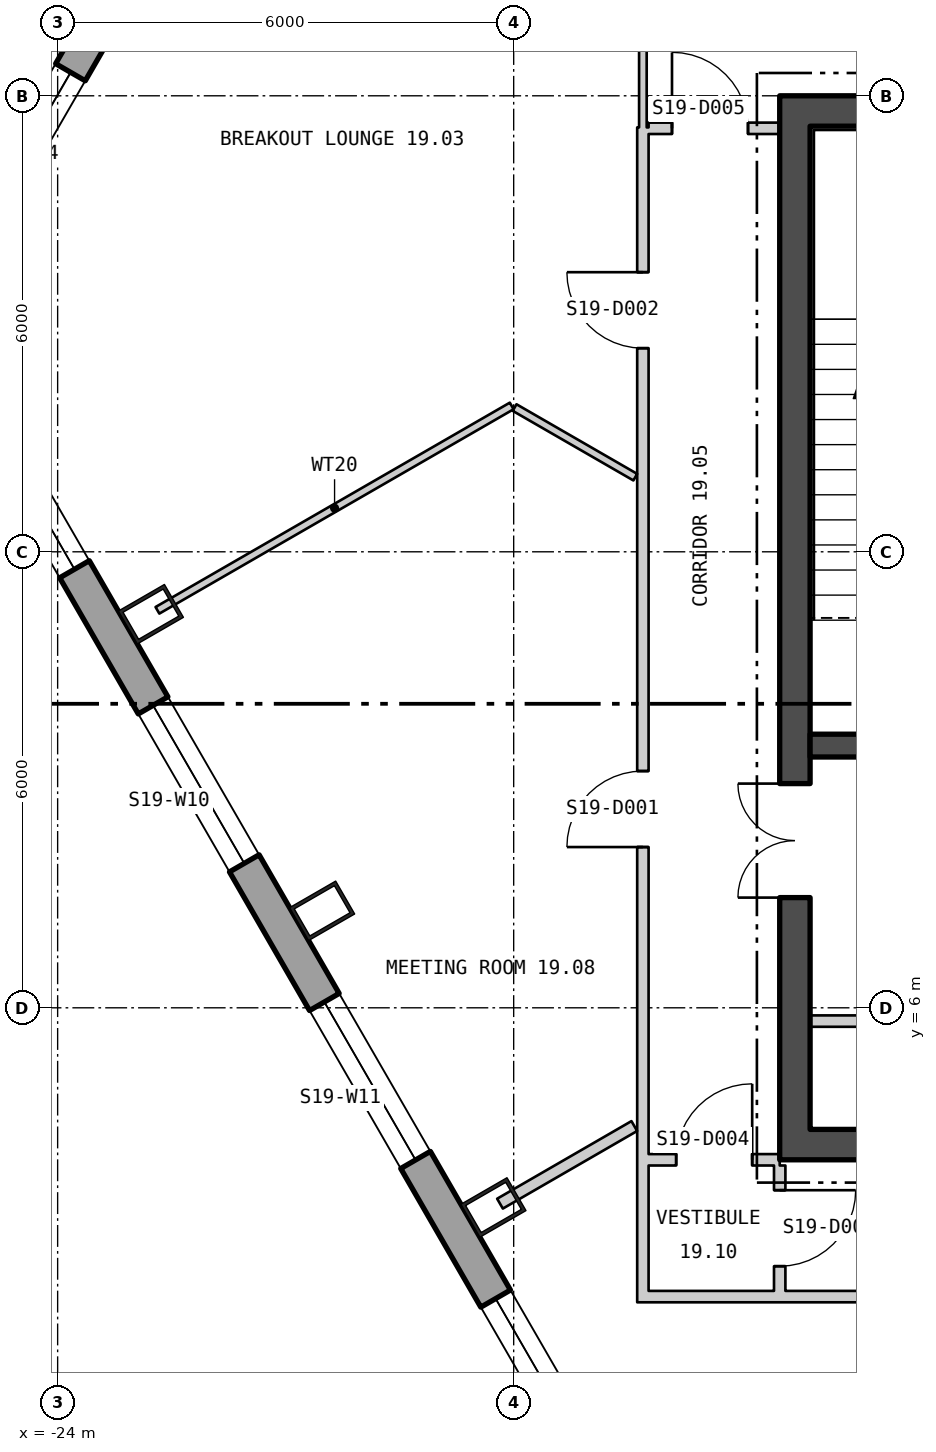
"""IFC4 building model, lengths in metres.
Left out: names, types, materials, properties, quantities, classifications, styles, units other than length and angle.
Written with IfcOpenShell. Run it as: python <this file> out.ifc"""

import sys

from ifc_helpers import new_model, si_unit, direction, frame, frame_2d, origin, origin_2d, place, context, subcontext, project, spatial, polyline, rectangle, hollow_rectangle, outline, extrude, element, fill, save


model = new_model("IFC4")
c1 = context("Model", 3, precision=1e-05, world=origin(), true_north=direction((0.0, 1.0)))
c2 = subcontext(c1, "Body", "Model", "MODEL_VIEW")
j1 = project(units=[si_unit("LENGTHUNIT", "METRE"), si_unit("PLANEANGLEUNIT", "RADIAN")], contexts=[c1])
p1 = place(None, origin())
s1 = spatial("IfcSite", under=j1, at=p1, CompositionType="ELEMENT")
p2 = place(p1, origin())
s2 = spatial("IfcBuilding", under=s1, at=p2, CompositionType="ELEMENT")
p3 = place(p2, frame((0.0, 0.0, 257.1)))
s3 = spatial("IfcBuildingStorey", under=s2, at=p3, CompositionType="ELEMENT", Elevation=257.1)
for number, where, z_axis, x_axis in (
    (1, (-22.773, 11.179, 0.0), (0.0, 0.0, 1.0), (0.5, -0.866, 0.0)),
    (2, (-20.52, 7.276, 0.0), (0.0, 0.0, 1.0), (0.5, -0.866, 0.0)),
    (3, (-18.266, 3.373, 0.0), (0.0, 0.0, 1.0), (0.5, -0.866, 0.0)),
):
    element("IfcColumn", number, at=place(p3, frame(where, z_axis=z_axis, x_axis=x_axis)), inside=s3, PredefinedType="COLUMN", context=c2, shape_type="SweptSolid", body=[
        extrude(hollow_rectangle(XDim=0.5, YDim=0.7, WallThickness=0.045, at=origin_2d()), origin(), (0.0, 0.0, 1.0), 3.9),
    ])
p4 = place(p3, frame((-22.869, 19.977, -0.4), z_axis=(0.0, 0.0, 1.0), x_axis=(-0.50000128263, -0.866024663256, 0.0)))
e4 = element("IfcWall", 4, at=p4, inside=s3, PredefinedType="SOLIDWALL", context=c2, shape_type="SweptSolid", body=[
    extrude(outline(polyline([(-0.13, -0.225), (5.78, -0.225), (5.52, 0.225), (0.13, 0.225), (-0.13, -0.225)])), origin(), (0.0, 0.0, 1.0), 3.9),
])
p5 = place(p4, frame((1.925, 0.0, 1.3)))
e5 = element("IfcOpeningElement", 5, at=p5, cuts=e4, PredefinedType="OPENING", context=c2, shape_type="SweptSolid", body=[
    extrude(rectangle(XDim=1.8, YDim=2.0, at=frame_2d((0.9, 1.0))), frame((0.0, 0.235, 0.0), z_axis=(0.0, -1.0, 0.0), x_axis=(1.0, 0.0, 0.0)), (0.0, 0.0, 1.0), 0.47),
])
p6 = place(p3, frame((-25.69, 15.082, -0.18), z_axis=(0.0, 0.0, 1.0), x_axis=(0.500000141277, -0.866025322218, 0.0)))
e6 = element("IfcWall", 6, at=p6, inside=s3, PredefinedType="SOLIDWALL", context=c2, shape_type="SweptSolid", body=[
    extrude(outline(polyline([(-0.13, -0.225), (45.86, -0.225), (45.6, 0.225), (0.13, 0.225), (-0.13, -0.225)])), origin(), (0.0, 0.0, 1.0), 3.68),
])
p7 = place(p6, frame((1.424, 0.0, 1.08)))
e7 = element("IfcOpeningElement", 7, at=p7, cuts=e6, PredefinedType="OPENING", context=c2, shape_type="SweptSolid", body=[
    extrude(rectangle(XDim=2.4, YDim=2.0, at=frame_2d((1.2, 1.0))), frame((0.0, 0.235, 0.0), z_axis=(0.0, -1.0, 0.0), x_axis=(1.0, 0.0, 0.0)), (0.0, 0.0, 1.0), 0.47),
])
p8 = place(p6, frame((5.892, 0.0, 1.08)))
e8 = element("IfcOpeningElement", 8, at=p8, cuts=e6, PredefinedType="OPENING", context=c2, shape_type="SweptSolid", body=[
    extrude(rectangle(XDim=2.4, YDim=2.0, at=frame_2d((1.2, 1.0))), frame((0.0, 0.235, 0.0), z_axis=(0.0, -1.0, 0.0), x_axis=(1.0, 0.0, 0.0)), (0.0, 0.0, 1.0), 0.47),
])
p9 = place(p6, frame((10.399, 0.0, 1.08)))
e9 = element("IfcOpeningElement", 9, at=p9, cuts=e6, PredefinedType="OPENING", context=c2, shape_type="SweptSolid", body=[
    extrude(rectangle(XDim=2.4, YDim=2.0, at=frame_2d((1.2, 1.0))), frame((0.0, 0.235, 0.0), z_axis=(0.0, -1.0, 0.0), x_axis=(1.0, 0.0, 0.0)), (0.0, 0.0, 1.0), 0.47),
])
p10 = place(p6, frame((14.905, 0.0, 1.08)))
e10 = element("IfcOpeningElement", 10, at=p10, cuts=e6, PredefinedType="OPENING", context=c2, shape_type="SweptSolid", body=[
    extrude(rectangle(XDim=2.4, YDim=2.0, at=frame_2d((1.2, 1.0))), frame((0.0, 0.235, 0.0), z_axis=(0.0, -1.0, 0.0), x_axis=(1.0, 0.0, 0.0)), (0.0, 0.0, 1.0), 0.47),
])
p11 = place(p6, frame((19.412, 0.0, 1.08)))
e11 = element("IfcOpeningElement", 11, at=p11, cuts=e6, PredefinedType="OPENING", context=c2, shape_type="SweptSolid", body=[
    extrude(rectangle(XDim=2.4, YDim=2.0, at=frame_2d((1.2, 1.0))), frame((0.0, 0.235, 0.0), z_axis=(0.0, -1.0, 0.0), x_axis=(1.0, 0.0, 0.0)), (0.0, 0.0, 1.0), 0.47),
])
p12 = place(p6, frame((23.918, 0.0, 1.08)))
e12 = element("IfcOpeningElement", 12, at=p12, cuts=e6, PredefinedType="OPENING", context=c2, shape_type="SweptSolid", body=[
    extrude(rectangle(XDim=2.4, YDim=2.0, at=frame_2d((1.2, 1.0))), frame((0.0, 0.235, 0.0), z_axis=(0.0, -1.0, 0.0), x_axis=(1.0, 0.0, 0.0)), (0.0, 0.0, 1.0), 0.47),
])
p13 = place(p6, frame((28.425, 0.0, 1.08)))
e13 = element("IfcOpeningElement", 13, at=p13, cuts=e6, PredefinedType="OPENING", context=c2, shape_type="SweptSolid", body=[
    extrude(rectangle(XDim=2.4, YDim=2.0, at=frame_2d((1.2, 1.0))), frame((0.0, 0.235, 0.0), z_axis=(0.0, -1.0, 0.0), x_axis=(1.0, 0.0, 0.0)), (0.0, 0.0, 1.0), 0.47),
])
p14 = place(p6, frame((32.932, 0.0, 1.08)))
e14 = element("IfcOpeningElement", 14, at=p14, cuts=e6, PredefinedType="OPENING", context=c2, shape_type="SweptSolid", body=[
    extrude(rectangle(XDim=2.4, YDim=2.0, at=frame_2d((1.2, 1.0))), frame((0.0, 0.235, 0.0), z_axis=(0.0, -1.0, 0.0), x_axis=(1.0, 0.0, 0.0)), (0.0, 0.0, 1.0), 0.47),
])
p15 = place(p6, frame((37.438, 0.0, 1.08)))
e15 = element("IfcOpeningElement", 15, at=p15, cuts=e6, PredefinedType="OPENING", context=c2, shape_type="SweptSolid", body=[
    extrude(rectangle(XDim=2.4, YDim=2.0, at=frame_2d((1.2, 1.0))), frame((0.0, 0.235, 0.0), z_axis=(0.0, -1.0, 0.0), x_axis=(1.0, 0.0, 0.0)), (0.0, 0.0, 1.0), 0.47),
])
p16 = place(p6, frame((41.907, 0.0, 1.08)))
e16 = element("IfcOpeningElement", 16, at=p16, cuts=e6, PredefinedType="OPENING", context=c2, shape_type="SweptSolid", body=[
    extrude(rectangle(XDim=2.4, YDim=2.0, at=frame_2d((1.2, 1.0))), frame((0.0, 0.235, 0.0), z_axis=(0.0, -1.0, 0.0), x_axis=(1.0, 0.0, 0.0)), (0.0, 0.0, 1.0), 0.47),
])
p17 = place(p3, frame((-14.5, 4.2, 0.0), z_axis=(0.0, 0.0, 1.0), x_axis=(1.0, 0.0, 0.0)))
e17 = element("IfcWall", 17, at=p17, inside=s3, PredefinedType="SHEAR", context=c2, shape_type="SweptSolid", body=[
    extrude(rectangle(XDim=29.0, YDim=0.4, at=frame_2d((14.5, 0.0))), origin(), (0.0, 0.0, 1.0), 3.7),
])
p18 = place(p17, frame((9.0, 0.0, 0.0)))
e18 = element("IfcOpeningElement", 18, at=p18, cuts=e17, PredefinedType="OPENING", context=c2, shape_type="SweptSolid", body=[
    extrude(rectangle(XDim=1.8, YDim=2.4, at=frame_2d((0.9, 1.2))), frame((0.0, 0.21, 0.0), z_axis=(0.0, -1.0, 0.0), x_axis=(1.0, 0.0, 0.0)), (0.0, 0.0, 1.0), 0.42),
])
p19 = place(p17, frame((19.0, 0.0, 0.0)))
e19 = element("IfcOpeningElement", 19, at=p19, cuts=e17, PredefinedType="OPENING", context=c2, shape_type="SweptSolid", body=[
    extrude(rectangle(XDim=1.8, YDim=2.4, at=frame_2d((0.9, 1.2))), frame((0.0, 0.21, 0.0), z_axis=(0.0, -1.0, 0.0), x_axis=(1.0, 0.0, 0.0)), (0.0, 0.0, 1.0), 0.42),
])
p20 = place(p3, frame((-14.5, 17.8, 0.0), z_axis=(0.0, 0.0, 1.0), x_axis=(1.0, 0.0, 0.0)))
e20 = element("IfcWall", 20, at=p20, inside=s3, PredefinedType="SHEAR", context=c2, shape_type="SweptSolid", body=[
    extrude(rectangle(XDim=29.0, YDim=0.4, at=frame_2d((14.5, 0.0))), origin(), (0.0, 0.0, 1.0), 3.7),
])
p21 = place(p3, frame((-14.3, 4.4, 0.0), z_axis=(0.0, 0.0, 1.0), x_axis=(0.0, 1.0, 0.0)))
e21 = element("IfcWall", 21, at=p21, inside=s3, PredefinedType="SHEAR", context=c2, shape_type="SweptSolid", body=[
    extrude(rectangle(XDim=13.2, YDim=0.4, at=frame_2d((6.6, 0.0))), origin(), (0.0, 0.0, 1.0), 3.7),
])
p22 = place(p21, frame((3.05, 0.0, 0.0)))
e22 = element("IfcOpeningElement", 22, at=p22, cuts=e21, PredefinedType="OPENING", context=c2, shape_type="SweptSolid", body=[
    extrude(rectangle(XDim=1.5, YDim=2.1, at=frame_2d((0.75, 1.05))), frame((0.0, 0.21, 0.0), z_axis=(0.0, -1.0, 0.0), x_axis=(1.0, 0.0, 0.0)), (0.0, 0.0, 1.0), 0.42),
])
p23 = place(p3, frame((-14.1, 9.45, 0.0), z_axis=(0.0, 0.0, 1.0), x_axis=(1.0, 0.0, 0.0)))
e23 = element("IfcWall", 23, at=p23, inside=s3, PredefinedType="SHEAR", context=c2, shape_type="SweptSolid", body=[
    extrude(rectangle(XDim=3.1, YDim=0.3, at=frame_2d((1.55, 0.0))), origin(), (0.0, 0.0, 1.0), 3.7),
])
p24 = place(p23, frame((0.95, 0.0, 0.0)))
e24 = element("IfcOpeningElement", 24, at=p24, cuts=e23, PredefinedType="OPENING", context=c2, shape_type="SweptSolid", body=[
    extrude(rectangle(XDim=1.2, YDim=2.1, at=frame_2d((0.6, 1.05))), frame((0.0, 0.16, 0.0), z_axis=(0.0, -1.0, 0.0), x_axis=(1.0, 0.0, 0.0)), (0.0, 0.0, 1.0), 0.32),
])
p25 = place(p3, frame((-14.1, 5.825, 0.0), z_axis=(0.0, 0.0, 1.0), x_axis=(1.0, 0.0, 0.0)))
e25 = element("IfcWall", 25, at=p25, inside=s3, PredefinedType="PARTITIONING", context=c2, shape_type="SweptSolid", body=[
    extrude(rectangle(XDim=3.1, YDim=0.15, at=frame_2d((1.55, 0.0))), origin(), (0.0, 0.0, 1.0), 3.7),
])
p26 = place(p3, frame((-22.687, 11.23, 0.0), z_axis=(0.0, 0.0, 1.0), x_axis=(0.866188679886, 0.499717090799, 0.0)))
e26 = element("IfcWall", 26, at=p26, inside=s3, PredefinedType="PARTITIONING", context=c2, shape_type="SweptSolid", body=[
    extrude(rectangle(XDim=5.381, YDim=0.1, at=frame_2d((2.691, 0.0))), origin(), (0.0, 0.0, 1.0), 3.7),
])
p27 = place(p3, frame((-18.18, 3.423, 0.0), z_axis=(0.0, 0.0, 1.0), x_axis=(0.865850922242, 0.500302089196, 0.0)))
e27 = element("IfcWall", 27, at=p27, inside=s3, PredefinedType="PARTITIONING", context=c2, shape_type="SweptSolid", body=[
    extrude(rectangle(XDim=2.041, YDim=0.15, at=frame_2d((1.02, 0.0))), origin(), (0.0, 0.0, 1.0), 3.7),
])
p28 = place(p3, frame((-17.988, 13.898, 0.0), z_axis=(0.0, 0.0, 1.0), x_axis=(0.866221908719, -0.499659488908, 0.0)))
e28 = element("IfcWall", 28, at=p28, inside=s3, PredefinedType="PARTITIONING", context=c2, shape_type="SweptSolid", body=[
    extrude(rectangle(XDim=1.833, YDim=0.1, at=frame_2d((0.917, 0.0))), origin(), (0.0, 0.0, 1.0), 3.7),
])
p29 = place(p3, frame((-16.3, 2.125, 0.0), z_axis=(0.0, 0.0, 1.0), x_axis=(0.0, 1.0, 0.0)))
e29 = element("IfcWall", 29, at=p29, inside=s3, PredefinedType="PARTITIONING", context=c2, shape_type="SweptSolid", body=[
    extrude(rectangle(XDim=15.459, YDim=0.15, at=frame_2d((7.729, 0.0))), origin(), (0.0, 0.0, 1.0), 3.7),
])
p30 = place(p29, frame((5.99, 0.0, 0.0)))
e30 = element("IfcOpeningElement", 30, at=p30, cuts=e29, PredefinedType="OPENING", context=c2, shape_type="SweptSolid", body=[
    extrude(rectangle(XDim=1.0, YDim=2.1, at=frame_2d((0.5, 1.05))), frame((0.0, 0.085, 0.0), z_axis=(0.0, -1.0, 0.0), x_axis=(1.0, 0.0, 0.0)), (0.0, 0.0, 1.0), 0.17),
])
p31 = place(p29, frame((12.554, 0.0, 0.0)))
e31 = element("IfcOpeningElement", 31, at=p31, cuts=e29, PredefinedType="OPENING", context=c2, shape_type="SweptSolid", body=[
    extrude(rectangle(XDim=1.0, YDim=2.1, at=frame_2d((0.5, 1.05))), frame((0.0, 0.085, 0.0), z_axis=(0.0, -1.0, 0.0), x_axis=(1.0, 0.0, 0.0)), (0.0, 0.0, 1.0), 0.17),
])
p32 = place(p3, frame((-16.3, 17.584, 0.0), z_axis=(0.0, 0.0, 1.0), x_axis=(0.0, 1.0, 0.0)))
e32 = element("IfcWall", 32, at=p32, inside=s3, PredefinedType="PARTITIONING", context=c2, shape_type="SweptSolid", body=[
    extrude(rectangle(XDim=2.166, YDim=0.1, at=frame_2d((1.083, 0.0))), origin(), (0.0, 0.0, 1.0), 3.7),
])
p33 = place(p3, frame((-16.225, 2.2, 0.0), z_axis=(0.0, 0.0, 1.0), x_axis=(1.0, 0.0, 0.0)))
e33 = element("IfcWall", 33, at=p33, inside=s3, PredefinedType="PARTITIONING", context=c2, shape_type="SweptSolid", body=[
    extrude(rectangle(XDim=8.27, YDim=0.15, at=frame_2d((4.135, 0.0))), origin(), (0.0, 0.0, 1.0), 3.7),
])
p34 = place(p33, frame((3.584, 0.0, 0.0)))
e34 = element("IfcOpeningElement", 34, at=p34, cuts=e33, PredefinedType="OPENING", context=c2, shape_type="SweptSolid", body=[
    extrude(rectangle(XDim=1.0, YDim=2.1, at=frame_2d((0.5, 1.05))), frame((0.0, 0.085, 0.0), z_axis=(0.0, -1.0, 0.0), x_axis=(1.0, 0.0, 0.0)), (0.0, 0.0, 1.0), 0.17),
])
p35 = place(p3, frame((-16.225, 4.0, 0.0), z_axis=(0.0, 0.0, 1.0), x_axis=(1.0, 0.0, 0.0)))
e35 = element("IfcWall", 35, at=p35, inside=s3, PredefinedType="PARTITIONING", context=c2, shape_type="SweptSolid", body=[
    extrude(rectangle(XDim=1.725, YDim=0.15, at=frame_2d((0.863, 0.0))), origin(), (0.0, 0.0, 1.0), 3.16),
])
p36 = place(p35, frame((0.363, 0.0, 0.0)))
e36 = element("IfcOpeningElement", 36, at=p36, cuts=e35, PredefinedType="OPENING", context=c2, shape_type="SweptSolid", body=[
    extrude(rectangle(XDim=1.0, YDim=2.1, at=frame_2d((0.5, 1.05))), frame((0.0, 0.085, 0.0), z_axis=(0.0, -1.0, 0.0), x_axis=(1.0, 0.0, 0.0)), (0.0, 0.0, 1.0), 0.17),
])
p37 = place(p3, frame((-16.225, 17.572, 0.0), z_axis=(0.0, 0.0, 1.0), x_axis=(1.0, 0.0, 0.0)))
e37 = element("IfcWall", 37, at=p37, inside=s3, PredefinedType="PARTITIONING", context=c2, shape_type="SweptSolid", body=[
    extrude(rectangle(XDim=1.725, YDim=0.15, at=frame_2d((0.863, 0.0))), origin(), (0.0, 0.0, 1.0), 3.7),
])
p38 = place(p37, frame((0.308, 0.0, 0.0)))
e38 = element("IfcOpeningElement", 38, at=p38, cuts=e37, PredefinedType="OPENING", context=c2, shape_type="SweptSolid", body=[
    extrude(rectangle(XDim=1.0, YDim=2.1, at=frame_2d((0.5, 1.05))), frame((0.0, 0.085, 0.0), z_axis=(0.0, -1.0, 0.0), x_axis=(1.0, 0.0, 0.0)), (0.0, 0.0, 1.0), 0.17),
])
p39 = place(p3, frame((-14.5, 2.275, 0.0), z_axis=(0.0, 0.0, 1.0), x_axis=(0.0, 1.0, 0.0)))
e39 = element("IfcWall", 39, at=p39, inside=s3, PredefinedType="PARTITIONING", context=c2, shape_type="SweptSolid", body=[
    extrude(rectangle(XDim=1.65, YDim=0.15, at=frame_2d((0.825, 0.0))), origin(), (0.0, 0.0, 1.0), 3.7),
])
p40 = place(p39, frame((0.325, 0.0, 0.0)))
e40 = element("IfcOpeningElement", 40, at=p40, cuts=e39, PredefinedType="OPENING", context=c2, shape_type="SweptSolid", body=[
    extrude(rectangle(XDim=1.0, YDim=2.1, at=frame_2d((0.5, 1.05))), frame((0.0, 0.085, 0.0), z_axis=(0.0, -1.0, 0.0), x_axis=(1.0, 0.0, 0.0)), (0.0, 0.0, 1.0), 0.17),
])
p41 = place(p5, origin())
e41 = element("IfcWindow", 41, at=p41, inside=s3, PartitioningType="SINGLE_PANEL", PredefinedType="WINDOW", context=c2, shape_type="SweptSolid", body=[
    extrude(rectangle(XDim=1.8, YDim=2.0, at=frame_2d((0.9, 1.0))), frame((0.0, 0.105, 0.0), z_axis=(0.0, -1.0, 0.0), x_axis=(1.0, 0.0, 0.0)), (0.0, 0.0, 1.0), 0.06),
])
fill(e5, e41)
p42 = place(p7, origin())
e42 = element("IfcWindow", 42, at=p42, inside=s3, PartitioningType="SINGLE_PANEL", PredefinedType="WINDOW", context=c2, shape_type="SweptSolid", body=[
    extrude(rectangle(XDim=2.4, YDim=2.0, at=frame_2d((1.2, 1.0))), frame((0.0, 0.105, 0.0), z_axis=(0.0, -1.0, 0.0), x_axis=(1.0, 0.0, 0.0)), (0.0, 0.0, 1.0), 0.06),
])
fill(e7, e42)
p43 = place(p8, origin())
e43 = element("IfcWindow", 43, at=p43, inside=s3, PartitioningType="SINGLE_PANEL", PredefinedType="WINDOW", context=c2, shape_type="SweptSolid", body=[
    extrude(rectangle(XDim=2.4, YDim=2.0, at=frame_2d((1.2, 1.0))), frame((0.0, 0.105, 0.0), z_axis=(0.0, -1.0, 0.0), x_axis=(1.0, 0.0, 0.0)), (0.0, 0.0, 1.0), 0.06),
])
fill(e8, e43)
p44 = place(p9, origin())
e44 = element("IfcWindow", 44, at=p44, inside=s3, PartitioningType="SINGLE_PANEL", PredefinedType="WINDOW", context=c2, shape_type="SweptSolid", body=[
    extrude(rectangle(XDim=2.4, YDim=2.0, at=frame_2d((1.2, 1.0))), frame((0.0, 0.105, 0.0), z_axis=(0.0, -1.0, 0.0), x_axis=(1.0, 0.0, 0.0)), (0.0, 0.0, 1.0), 0.06),
])
fill(e9, e44)
p45 = place(p10, origin())
e45 = element("IfcWindow", 45, at=p45, inside=s3, PartitioningType="SINGLE_PANEL", PredefinedType="WINDOW", context=c2, shape_type="SweptSolid", body=[
    extrude(rectangle(XDim=2.4, YDim=2.0, at=frame_2d((1.2, 1.0))), frame((0.0, 0.105, 0.0), z_axis=(0.0, -1.0, 0.0), x_axis=(1.0, 0.0, 0.0)), (0.0, 0.0, 1.0), 0.06),
])
fill(e10, e45)
p46 = place(p22, origin())
e46 = element("IfcDoor", 46, at=p46, inside=s3, OperationType="DOUBLE_DOOR_SINGLE_SWING", PredefinedType="DOOR", context=c2, shape_type="SweptSolid", body=[
    extrude(rectangle(XDim=1.5, YDim=2.1, at=frame_2d((0.75, 1.05))), frame((0.0, 0.025, 0.0), z_axis=(0.0, -1.0, 0.0), x_axis=(1.0, 0.0, 0.0)), (0.0, 0.0, 1.0), 0.05),
])
fill(e22, e46)
p47 = place(p30, origin())
e47 = element("IfcDoor", 47, at=p47, inside=s3, OperationType="SINGLE_SWING_RIGHT", PredefinedType="DOOR", context=c2, shape_type="SweptSolid", body=[
    extrude(rectangle(XDim=1.0, YDim=2.1, at=frame_2d((0.5, 1.05))), frame((0.0, 0.025, 0.0), z_axis=(0.0, -1.0, 0.0), x_axis=(1.0, 0.0, 0.0)), (0.0, 0.0, 1.0), 0.05),
])
fill(e30, e47)
p48 = place(p31, origin())
e48 = element("IfcDoor", 48, at=p48, inside=s3, OperationType="SINGLE_SWING_LEFT", PredefinedType="DOOR", context=c2, shape_type="SweptSolid", body=[
    extrude(rectangle(XDim=1.0, YDim=2.1, at=frame_2d((0.5, 1.05))), frame((0.0, 0.025, 0.0), z_axis=(0.0, -1.0, 0.0), x_axis=(1.0, 0.0, 0.0)), (0.0, 0.0, 1.0), 0.05),
])
fill(e31, e48)
p49 = place(p36, origin())
e49 = element("IfcDoor", 49, at=p49, inside=s3, OperationType="SINGLE_SWING_LEFT", PredefinedType="DOOR", context=c2, shape_type="SweptSolid", body=[
    extrude(rectangle(XDim=1.0, YDim=2.1, at=frame_2d((0.5, 1.05))), frame((0.0, 0.025, 0.0), z_axis=(0.0, -1.0, 0.0), x_axis=(1.0, 0.0, 0.0)), (0.0, 0.0, 1.0), 0.05),
])
fill(e36, e49)
p50 = place(p38, origin())
e50 = element("IfcDoor", 50, at=p50, inside=s3, OperationType="SINGLE_SWING_RIGHT", PredefinedType="DOOR", context=c2, shape_type="SweptSolid", body=[
    extrude(rectangle(XDim=1.0, YDim=2.1, at=frame_2d((0.5, 1.05))), frame((0.0, 0.025, 0.0), z_axis=(0.0, -1.0, 0.0), x_axis=(1.0, 0.0, 0.0)), (0.0, 0.0, 1.0), 0.05),
])
fill(e38, e50)
p51 = place(p40, origin())
e51 = element("IfcDoor", 51, at=p51, inside=s3, OperationType="SINGLE_SWING_RIGHT", PredefinedType="DOOR", context=c2, shape_type="SweptSolid", body=[
    extrude(rectangle(XDim=1.0, YDim=2.1, at=frame_2d((0.5, 1.05))), frame((0.0, 0.025, 0.0), z_axis=(0.0, -1.0, 0.0), x_axis=(1.0, 0.0, 0.0)), (0.0, 0.0, 1.0), 0.05),
])
fill(e40, e51)
save(model, sys.argv[1])
